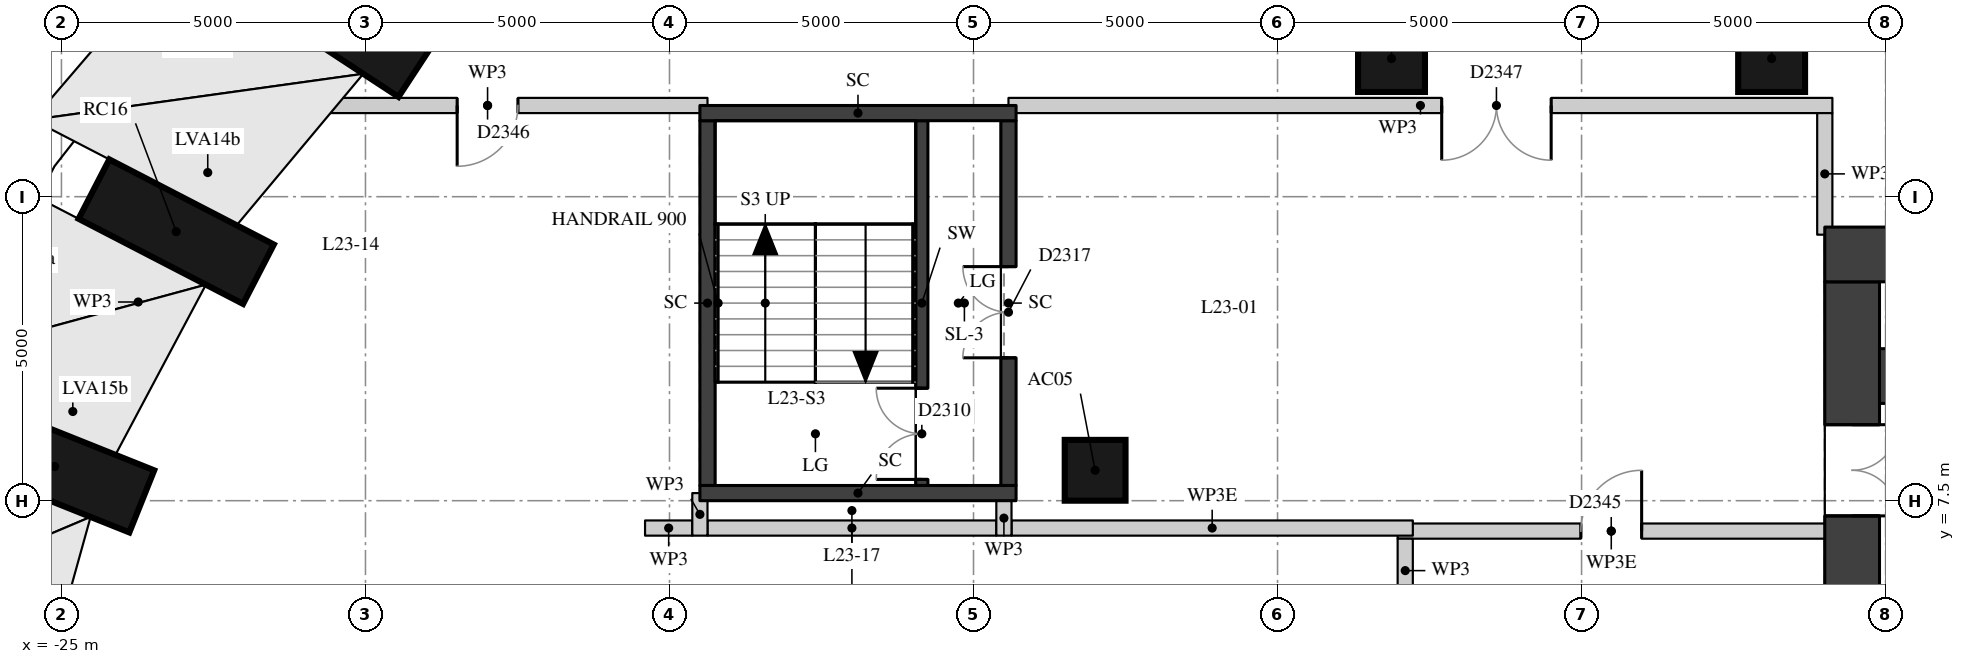
"""IFC4 building model, lengths in metres.
Left out: names, types, materials, properties, quantities, classifications, styles, units other than length and angle.
Written with IfcOpenShell. Run it as: python <this file> out.ifc"""

import sys

from ifc_helpers import new_model, si_unit, direction, frame, frame_2d, origin, origin_2d, place, context, subcontext, project, spatial, rectangle, extrude, element, fill, save


model = new_model("IFC4")
c1 = context("Model", 3, precision=1e-05, world=origin(), true_north=direction((0.0, 1.0)))
c2 = subcontext(c1, "Body", "Model", "MODEL_VIEW")
j1 = project(units=[si_unit("LENGTHUNIT", "METRE"), si_unit("PLANEANGLEUNIT", "RADIAN")], contexts=[c1])
p1 = place(None, origin())
s1 = spatial("IfcSite", under=j1, at=p1, CompositionType="ELEMENT")
p2 = place(p1, origin())
s2 = spatial("IfcBuilding", under=s1, at=p2, CompositionType="ELEMENT")
p3 = place(p2, frame((0.0, 0.0, 84.4)))
s3 = spatial("IfcBuildingStorey", under=s2, at=p3, CompositionType="ELEMENT", Elevation=84.4)
p4 = place(p3, frame((-21.641, 16.23, 0.483), z_axis=(0.538208092319, -0.352637325714, 0.765492629537), x_axis=(-0.640294887233, 0.419525235545, 0.64344466283)))
e1 = element("IfcColumn", 1, at=p4, inside=s3, PredefinedType="COLUMN", context=c2, shape_type="SweptSolid", body=[
    extrude(rectangle(XDim=1.5, YDim=1.1, at=origin_2d()), origin(), (0.0, 0.0, 1.0), 4.618),
])
p5 = place(p3, frame((-24.465, 12.625, 0.491), z_axis=(0.581326092093, -0.300814349974, 0.75602295038), x_axis=(-0.671452374876, 0.347451305617, 0.65454510807)))
e2 = element("IfcColumn", 2, at=p5, inside=s3, PredefinedType="COLUMN", context=c2, shape_type="SweptSolid", body=[
    extrude(rectangle(XDim=1.5, YDim=1.1, at=origin_2d()), origin(), (0.0, 0.0, 1.0), 4.654),
])
p6 = place(p3, frame((-26.546, 8.636, 0.496), z_axis=(0.613411064023, -0.245416653031, 0.750664727391), x_axis=(-0.696954237932, 0.278841035678, 0.660683333414)))
e3 = element("IfcColumn", 3, at=p6, inside=s3, PredefinedType="COLUMN", context=c2, shape_type="SweptSolid", body=[
    extrude(rectangle(XDim=1.5, YDim=1.1, at=origin_2d()), origin(), (0.0, 0.0, 1.0), 4.675),
])
p7 = place(p3, frame((-8.0, 8.0, 0.0), z_axis=(0.0, 0.0, 1.0), x_axis=(1.0, 0.0, 0.0)))
e4 = element("IfcColumn", 4, at=p7, inside=s3, PredefinedType="COLUMN", context=c2, shape_type="SweptSolid", body=[
    extrude(rectangle(XDim=1.0, YDim=1.0, at=origin_2d()), origin(), (0.0, 0.0, 1.0), 4.5),
])
for number, where, z_axis, x_axis in (
    (5, (3.126, 14.772, 0.0), (0.0, 0.0, 1.0), (1.0, 0.0, 0.0)),
    (6, (-3.126, 14.772, 0.0), (0.0, 0.0, 1.0), (1.0, 0.0, 0.0)),
):
    element("IfcColumn", number, at=place(p3, frame(where, z_axis=z_axis, x_axis=x_axis)), inside=s3, PredefinedType="COLUMN", context=c2, shape_type="SweptSolid", body=[
        extrude(rectangle(XDim=1.1, YDim=1.1, at=origin_2d()), origin(), (0.0, 0.0, 1.0), 4.5),
    ])
p8 = place(p3, frame((4.45, -11.1, 0.0), z_axis=(0.0, 0.0, 1.0), x_axis=(0.0, 1.0, 0.0)))
e7 = element("IfcWall", 7, at=p8, inside=s3, PredefinedType="SHEAR", context=c2, shape_type="SweptSolid", body=[
    extrude(rectangle(XDim=22.2, YDim=0.9, at=frame_2d((11.1, 0.0))), origin(), (0.0, 0.0, 1.0), 4.22),
])
p9 = place(p8, frame((2.35, 0.0, 0.0)))
e8 = element("IfcOpeningElement", 8, at=p9, cuts=e7, PredefinedType="OPENING", context=c2, shape_type="SweptSolid", body=[
    extrude(rectangle(XDim=1.5, YDim=2.1, at=frame_2d((0.75, 1.05))), frame((0.0, 0.46, 0.0), z_axis=(0.0, -1.0, 0.0), x_axis=(1.0, 0.0, 0.0)), (0.0, 0.0, 1.0), 0.92),
])
p10 = place(p8, frame((5.45, 0.0, 0.0)))
e9 = element("IfcOpeningElement", 9, at=p10, cuts=e7, PredefinedType="OPENING", context=c2, shape_type="SweptSolid", body=[
    extrude(rectangle(XDim=1.8, YDim=2.1, at=frame_2d((0.9, 1.05))), frame((0.0, 0.46, 0.0), z_axis=(0.0, -1.0, 0.0), x_axis=(1.0, 0.0, 0.0)), (0.0, 0.0, 1.0), 0.92),
])
p11 = place(p8, frame((7.95, 0.0, 0.0)))
e10 = element("IfcOpeningElement", 10, at=p11, cuts=e7, PredefinedType="OPENING", context=c2, shape_type="SweptSolid", body=[
    extrude(rectangle(XDim=1.1, YDim=2.1, at=frame_2d((0.55, 1.05))), frame((0.0, 0.46, 0.0), z_axis=(0.0, -1.0, 0.0), x_axis=(1.0, 0.0, 0.0)), (0.0, 0.0, 1.0), 0.92),
])
p12 = place(p8, frame((10.6, 0.0, 0.0)))
e11 = element("IfcOpeningElement", 11, at=p12, cuts=e7, PredefinedType="OPENING", context=c2, shape_type="SweptSolid", body=[
    extrude(rectangle(XDim=1.0, YDim=2.1, at=frame_2d((0.5, 1.05))), frame((0.0, 0.46, 0.0), z_axis=(0.0, -1.0, 0.0), x_axis=(1.0, 0.0, 0.0)), (0.0, 0.0, 1.0), 0.92),
])
p13 = place(p8, frame((13.15, 0.0, 0.0)))
e12 = element("IfcOpeningElement", 12, at=p13, cuts=e7, PredefinedType="OPENING", context=c2, shape_type="SweptSolid", body=[
    extrude(rectangle(XDim=1.1, YDim=2.1, at=frame_2d((0.55, 1.05))), frame((0.0, 0.46, 0.0), z_axis=(0.0, -1.0, 0.0), x_axis=(1.0, 0.0, 0.0)), (0.0, 0.0, 1.0), 0.92),
])
p14 = place(p8, frame((14.95, 0.0, 0.0)))
e13 = element("IfcOpeningElement", 13, at=p14, cuts=e7, PredefinedType="OPENING", context=c2, shape_type="SweptSolid", body=[
    extrude(rectangle(XDim=1.8, YDim=2.1, at=frame_2d((0.9, 1.05))), frame((0.0, 0.46, 0.0), z_axis=(0.0, -1.0, 0.0), x_axis=(1.0, 0.0, 0.0)), (0.0, 0.0, 1.0), 0.92),
])
p15 = place(p8, frame((18.35, 0.0, 0.0)))
e14 = element("IfcOpeningElement", 14, at=p15, cuts=e7, PredefinedType="OPENING", context=c2, shape_type="SweptSolid", body=[
    extrude(rectangle(XDim=1.5, YDim=2.1, at=frame_2d((0.75, 1.05))), frame((0.0, 0.46, 0.0), z_axis=(0.0, -1.0, 0.0), x_axis=(1.0, 0.0, 0.0)), (0.0, 0.0, 1.0), 0.92),
])
p16 = place(p3, frame((4.0, 11.55, 0.0), z_axis=(0.0, 0.0, 1.0), x_axis=(1.0, 0.0, 0.0)))
e15 = element("IfcWall", 15, at=p16, inside=s3, PredefinedType="SHEAR", context=c2, shape_type="SweptSolid", body=[
    extrude(rectangle(XDim=15.2, YDim=0.9, at=frame_2d((7.6, 0.0))), origin(), (0.0, 0.0, 1.0), 4.22),
])
p17 = place(p3, frame((4.9, 9.55, 0.0), z_axis=(0.0, 0.0, 1.0), x_axis=(1.0, 0.0, 0.0)))
e16 = element("IfcWall", 16, at=p17, inside=s3, PredefinedType="SHEAR", context=c2, shape_type="SweptSolid", body=[
    extrude(rectangle(XDim=10.2, YDim=0.9, at=frame_2d((5.1, 0.0))), origin(), (0.0, 0.0, 1.0), 4.22),
])
p18 = place(p3, frame((-10.85, 7.75, 0.0), z_axis=(0.0, 0.0, 1.0), x_axis=(0.0, 1.0, 0.0)))
e17 = element("IfcWall", 17, at=p18, inside=s3, PredefinedType="SHEAR", context=c2, shape_type="SweptSolid", body=[
    extrude(rectangle(XDim=6.0, YDim=0.2, at=frame_2d((3.0, 0.0))), origin(), (0.0, 0.0, 1.0), 4.22),
])
p19 = place(p18, frame((0.1, 0.0, 0.0)))
e18 = element("IfcOpeningElement", 18, at=p19, cuts=e17, PredefinedType="OPENING", context=c2, shape_type="SweptSolid", body=[
    extrude(rectangle(XDim=1.5, YDim=2.1, at=frame_2d((0.75, 1.05))), frame((0.0, 0.11, 0.0), z_axis=(0.0, -1.0, 0.0), x_axis=(1.0, 0.0, 0.0)), (0.0, 0.0, 1.0), 0.22),
])
p20 = place(p3, frame((-14.375, 7.75, -0.45), z_axis=(0.0, 0.0, 1.0), x_axis=(0.0, 1.0, 0.0)))
e19 = element("IfcWall", 19, at=p20, inside=s3, PredefinedType="SHEAR", context=c2, shape_type="SweptSolid", body=[
    extrude(rectangle(XDim=6.0, YDim=0.25, at=frame_2d((3.0, 0.0))), origin(), (0.0, 0.0, 1.0), 4.67),
])
p21 = place(p3, frame((-9.425, 7.75, -0.45), z_axis=(0.0, 0.0, 1.0), x_axis=(0.0, 1.0, 0.0)))
e20 = element("IfcWall", 20, at=p21, inside=s3, PredefinedType="SHEAR", context=c2, shape_type="SweptSolid", body=[
    extrude(rectangle(XDim=6.0, YDim=0.25, at=frame_2d((3.0, 0.0))), origin(), (0.0, 0.0, 1.0), 4.67),
])
p22 = place(p21, frame((2.1, 0.0, 0.45)))
e21 = element("IfcOpeningElement", 21, at=p22, cuts=e20, PredefinedType="OPENING", context=c2, shape_type="SweptSolid", body=[
    extrude(rectangle(XDim=1.5, YDim=2.1, at=frame_2d((0.75, 1.05))), frame((0.0, 0.135, 0.0), z_axis=(0.0, -1.0, 0.0), x_axis=(1.0, 0.0, 0.0)), (0.0, 0.0, 1.0), 0.27),
])
for number, where, z_axis, x_axis in (
    (22, (-14.5, 13.875, -0.45), (0.0, 0.0, 1.0), (1.0, 0.0, 0.0)),
    (23, (-14.5, 7.625, -0.45), (0.0, 0.0, 1.0), (1.0, 0.0, 0.0)),
):
    element("IfcWall", number, at=place(p3, frame(where, z_axis=z_axis, x_axis=x_axis)), inside=s3, PredefinedType="SHEAR", context=c2, shape_type="SweptSolid", body=[
        extrude(rectangle(XDim=5.2, YDim=0.25, at=frame_2d((2.6, 0.0))), origin(), (0.0, 0.0, 1.0), 4.67),
    ])
p23 = place(p3, frame((-23.18, 11.836, 0.0), z_axis=(0.0, 0.0, 1.0), x_axis=(-0.462590248414, -0.886572197891, 0.0)))
e24 = element("IfcWall", 24, at=p23, inside=s3, PredefinedType="PARTITIONING", context=c2, shape_type="SweptSolid", body=[
    extrude(rectangle(XDim=2.409, YDim=0.25, at=frame_2d((1.205, 0.0))), origin(), (0.0, 0.0, 1.0), 4.22),
])
p24 = place(p3, frame((-3.025, 7.0, 0.0), z_axis=(0.0, 0.0, 1.0), x_axis=(1.0, 0.0, 0.0)))
e25 = element("IfcWall", 25, at=p24, inside=s3, PredefinedType="PARTITIONING", context=c2, shape_type="SweptSolid", body=[
    extrude(rectangle(XDim=7.027, YDim=0.25, at=frame_2d((3.513, 0.0))), origin(), (0.0, 0.0, 1.0), 3.67),
])
p25 = place(p24, frame((3.013, 0.0, 0.0)))
e26 = element("IfcOpeningElement", 26, at=p25, cuts=e25, PredefinedType="OPENING", context=c2, shape_type="SweptSolid", body=[
    extrude(rectangle(XDim=1.0, YDim=2.1, at=frame_2d((0.5, 1.05))), frame((0.0, 0.135, 0.0), z_axis=(0.0, -1.0, 0.0), x_axis=(1.0, 0.0, 0.0)), (0.0, 0.0, 1.0), 0.27),
])
p26 = place(p3, frame((-15.402, 7.05, 0.0), z_axis=(0.0, 0.0, 1.0), x_axis=(1.0, 0.0, 0.0)))
e27 = element("IfcWall", 27, at=p26, inside=s3, PredefinedType="PARTITIONING", context=c2, shape_type="SweptSolid", body=[
    extrude(rectangle(XDim=0.777, YDim=0.25, at=frame_2d((0.389, 0.0))), origin(), (0.0, 0.0, 1.0), 4.22),
])
p27 = place(p3, frame((-14.375, 7.05, 0.0), z_axis=(0.0, 0.0, 1.0), x_axis=(1.0, 0.0, 0.0)))
e28 = element("IfcWall", 28, at=p27, inside=s3, PredefinedType="PARTITIONING", context=c2, shape_type="SweptSolid", body=[
    extrude(rectangle(XDim=4.75, YDim=0.25, at=frame_2d((2.375, 0.0))), origin(), (0.0, 0.0, 1.0), 4.22),
])
p28 = place(p3, frame((-9.375, 7.05, 0.0), z_axis=(0.0, 0.0, 1.0), x_axis=(1.0, 0.0, 0.0)))
e29 = element("IfcWall", 29, at=p28, inside=s3, PredefinedType="PARTITIONING", context=c2, shape_type="SweptSolid", body=[
    extrude(rectangle(XDim=6.6, YDim=0.25, at=frame_2d((3.3, 0.0))), origin(), (0.0, 0.0, 1.0), 3.67),
])
p29 = place(p3, frame((-21.609, 14.0, 0.0), z_axis=(0.0, 0.0, 1.0), x_axis=(1.0, 0.0, 0.0)))
e30 = element("IfcWall", 30, at=p29, inside=s3, PredefinedType="PARTITIONING", context=c2, shape_type="SweptSolid", body=[
    extrude(rectangle(XDim=7.234, YDim=0.25, at=frame_2d((3.617, 0.0))), origin(), (0.0, 0.0, 1.0), 4.22),
])
p30 = place(p29, frame((3.117, 0.0, 0.0)))
e31 = element("IfcOpeningElement", 31, at=p30, cuts=e30, PredefinedType="OPENING", context=c2, shape_type="SweptSolid", body=[
    extrude(rectangle(XDim=1.0, YDim=2.1, at=frame_2d((0.5, 1.05))), frame((0.0, 0.135, 0.0), z_axis=(0.0, -1.0, 0.0), x_axis=(1.0, 0.0, 0.0)), (0.0, 0.0, 1.0), 0.27),
])
p31 = place(p3, frame((-9.425, 14.0, 0.0), z_axis=(0.0, 0.0, 1.0), x_axis=(1.0, 0.0, 0.0)))
e32 = element("IfcWall", 32, at=p31, inside=s3, PredefinedType="PARTITIONING", context=c2, shape_type="SweptSolid", body=[
    extrude(rectangle(XDim=13.55, YDim=0.25, at=frame_2d((6.775, 0.0))), origin(), (0.0, 0.0, 1.0), 4.22),
])
p32 = place(p31, frame((7.125, 0.0, 0.0)))
e33 = element("IfcOpeningElement", 33, at=p32, cuts=e32, PredefinedType="OPENING", context=c2, shape_type="SweptSolid", body=[
    extrude(rectangle(XDim=1.8, YDim=2.1, at=frame_2d((0.9, 1.05))), frame((0.0, 0.135, 0.0), z_axis=(0.0, -1.0, 0.0), x_axis=(1.0, 0.0, 0.0)), (0.0, 0.0, 1.0), 0.27),
])
p33 = place(p3, frame((-14.5, 6.925, 0.0), z_axis=(0.0, 0.0, 1.0), x_axis=(0.0, 1.0, 0.0)))
e34 = element("IfcWall", 34, at=p33, inside=s3, PredefinedType="PARTITIONING", context=c2, shape_type="SweptSolid", body=[
    extrude(rectangle(XDim=0.7, YDim=0.25, at=frame_2d((0.35, 0.0))), origin(), (0.0, 0.0, 1.0), 4.22),
])
p34 = place(p3, frame((-9.5, 6.925, 0.0), z_axis=(0.0, 0.0, 1.0), x_axis=(0.0, 1.0, 0.0)))
e35 = element("IfcWall", 35, at=p34, inside=s3, PredefinedType="PARTITIONING", context=c2, shape_type="SweptSolid", body=[
    extrude(rectangle(XDim=0.577, YDim=0.25, at=frame_2d((0.289, 0.0))), origin(), (0.0, 0.0, 1.0), 4.22),
])
p35 = place(p3, frame((-2.9, 5.825, 0.0), z_axis=(0.0, 0.0, 1.0), x_axis=(0.0, 1.0, 0.0)))
e36 = element("IfcWall", 36, at=p35, inside=s3, PredefinedType="PARTITIONING", context=c2, shape_type="SweptSolid", body=[
    extrude(rectangle(XDim=1.05, YDim=0.25, at=frame_2d((0.525, 0.0))), origin(), (0.0, 0.0, 1.0), 4.22),
])
p36 = place(p3, frame((4.0, 11.875, 0.0), z_axis=(0.0, 0.0, 1.0), x_axis=(0.0, 1.0, 0.0)))
e37 = element("IfcWall", 37, at=p36, inside=s3, PredefinedType="PARTITIONING", context=c2, shape_type="SweptSolid", body=[
    extrude(rectangle(XDim=2.0, YDim=0.25, at=frame_2d((1.0, 0.0))), origin(), (0.0, 0.0, 1.0), 4.22),
])
p37 = place(p15, origin())
e38 = element("IfcDoor", 38, at=p37, inside=s3, OperationType="DOUBLE_DOOR_SINGLE_SWING", PredefinedType="DOOR", context=c2, shape_type="SweptSolid", body=[
    extrude(rectangle(XDim=1.5, YDim=2.1, at=frame_2d((0.75, 1.05))), frame((0.0, 0.025, 0.0), z_axis=(0.0, -1.0, 0.0), x_axis=(1.0, 0.0, 0.0)), (0.0, 0.0, 1.0), 0.05),
])
fill(e14, e38)
p38 = place(p19, origin())
e39 = element("IfcDoor", 39, at=p38, inside=s3, OperationType="DOUBLE_DOOR_SINGLE_SWING", PredefinedType="DOOR", context=c2, shape_type="SweptSolid", body=[
    extrude(rectangle(XDim=1.5, YDim=2.1, at=frame_2d((0.75, 1.05))), frame((0.0, 0.025, 0.0), z_axis=(0.0, -1.0, 0.0), x_axis=(1.0, 0.0, 0.0)), (0.0, 0.0, 1.0), 0.05),
])
fill(e18, e39)
p39 = place(p22, origin())
e40 = element("IfcDoor", 40, at=p39, inside=s3, OperationType="DOUBLE_DOOR_SINGLE_SWING", PredefinedType="DOOR", context=c2, shape_type="SweptSolid", body=[
    extrude(rectangle(XDim=1.5, YDim=2.1, at=frame_2d((0.75, 1.05))), frame((0.0, 0.025, 0.0), z_axis=(0.0, -1.0, 0.0), x_axis=(1.0, 0.0, 0.0)), (0.0, 0.0, 1.0), 0.05),
])
fill(e21, e40)
p40 = place(p32, origin())
e41 = element("IfcDoor", 41, at=p40, inside=s3, OperationType="DOUBLE_DOOR_SINGLE_SWING", PredefinedType="DOOR", context=c2, shape_type="SweptSolid", body=[
    extrude(rectangle(XDim=1.8, YDim=2.1, at=frame_2d((0.9, 1.05))), frame((0.0, 0.025, 0.0), z_axis=(0.0, -1.0, 0.0), x_axis=(1.0, 0.0, 0.0)), (0.0, 0.0, 1.0), 0.05),
])
fill(e33, e41)
p41 = place(p30, origin())
e42 = element("IfcDoor", 42, at=p41, inside=s3, OperationType="SINGLE_SWING_RIGHT", PredefinedType="DOOR", context=c2, shape_type="SweptSolid", body=[
    extrude(rectangle(XDim=1.0, YDim=2.1, at=frame_2d((0.5, 1.05))), frame((0.0, 0.025, 0.0), z_axis=(0.0, -1.0, 0.0), x_axis=(1.0, 0.0, 0.0)), (0.0, 0.0, 1.0), 0.05),
])
fill(e31, e42)
p42 = place(p25, origin())
e43 = element("IfcDoor", 43, at=p42, inside=s3, OperationType="SINGLE_SWING_RIGHT", PredefinedType="DOOR", context=c2, shape_type="SweptSolid", body=[
    extrude(rectangle(XDim=1.0, YDim=2.1, at=frame_2d((0.5, 1.05))), frame((0.0, 0.025, 0.0), z_axis=(0.0, -1.0, 0.0), x_axis=(1.0, 0.0, 0.0)), (0.0, 0.0, 1.0), 0.05),
])
fill(e26, e43)
save(model, sys.argv[1])
